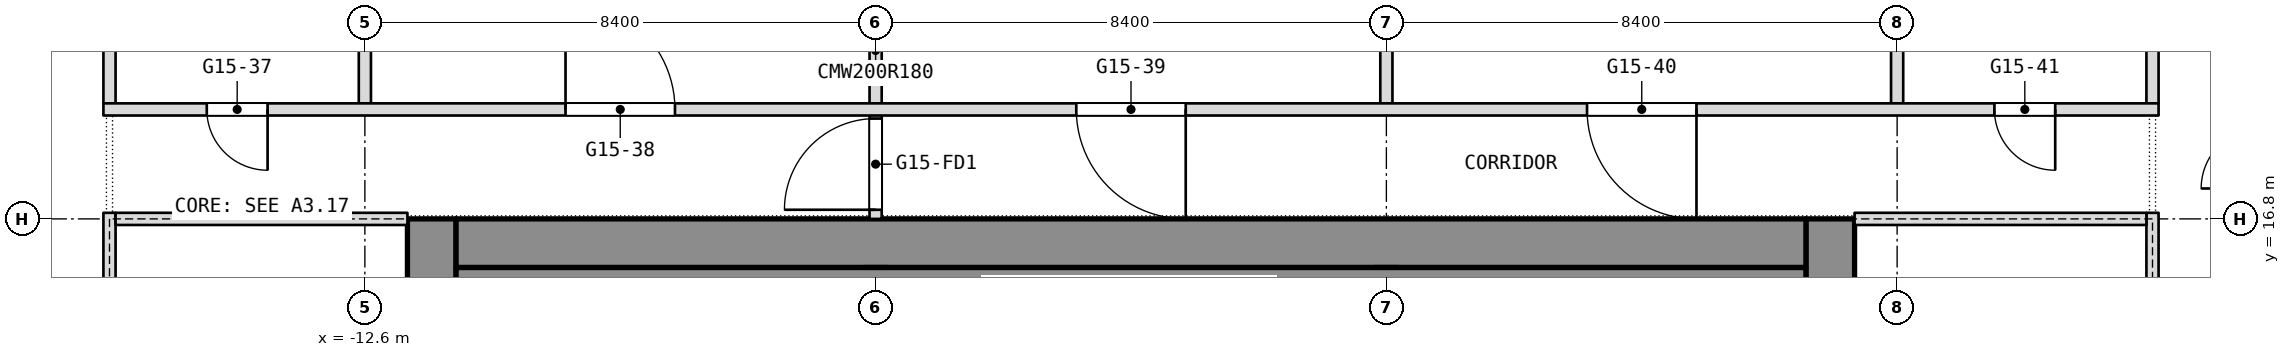
"""IFC4 building model, lengths in metres.
Left out: names, types, materials, properties, quantities, classifications, styles, units other than length and angle.
Written with IfcOpenShell. Run it as: python <this file> out.ifc"""

import sys

from ifc_helpers import new_model, si_unit, direction, frame, frame_2d, origin, place, context, subcontext, project, spatial, rectangle, extrude, element, fill, save


model = new_model("IFC4")
c1 = context("Model", 3, precision=1e-05, world=origin(), true_north=direction((0.0, 1.0)))
c2 = subcontext(c1, "Body", "Model", "MODEL_VIEW")
j1 = project(units=[si_unit("LENGTHUNIT", "METRE"), si_unit("PLANEANGLEUNIT", "RADIAN")], contexts=[c1])
p1 = place(None, origin())
s1 = spatial("IfcSite", under=j1, at=p1, CompositionType="ELEMENT")
p2 = place(p1, origin())
s2 = spatial("IfcBuilding", under=s1, at=p2, CompositionType="ELEMENT")
p3 = place(p2, frame((0.0, 0.0, 194.9)))
s3 = spatial("IfcBuildingStorey", under=s2, at=p3, CompositionType="ELEMENT", Elevation=194.9)
p4 = place(p3, frame((11.5, 0.0, 0.0), z_axis=(0.0, 0.0, 1.0), x_axis=(0.0, 1.0, 0.0)))
e1 = element("IfcWall", 1, at=p4, inside=s3, PredefinedType="SHEAR", context=c2, shape_type="SweptSolid", body=[
    extrude(rectangle(XDim=16.8, YDim=0.8, at=frame_2d((8.4, 0.0))), origin(), (0.0, 0.0, 1.0), 3.6),
])
p5 = place(p4, frame((2.3, 0.0, 0.0)))
e2 = element("IfcOpeningElement", 2, at=p5, cuts=e1, PredefinedType="OPENING", context=c2, shape_type="SweptSolid", body=[
    extrude(rectangle(XDim=1.1, YDim=2.1, at=frame_2d((0.55, 1.05))), frame((0.0, 0.4, 0.0), z_axis=(0.0, -1.0, 0.0), x_axis=(1.0, 0.0, 0.0)), (0.0, 0.0, 1.0), 0.8),
])
p6 = place(p4, frame((4.85, 0.0, 0.0)))
e3 = element("IfcOpeningElement", 3, at=p6, cuts=e1, PredefinedType="OPENING", context=c2, shape_type="SweptSolid", body=[
    extrude(rectangle(XDim=1.1, YDim=2.1, at=frame_2d((0.55, 1.05))), frame((0.0, 0.4, 0.0), z_axis=(0.0, -1.0, 0.0), x_axis=(1.0, 0.0, 0.0)), (0.0, 0.0, 1.0), 0.8),
])
p7 = place(p4, frame((6.825, 0.0, 0.0)))
e4 = element("IfcOpeningElement", 4, at=p7, cuts=e1, PredefinedType="OPENING", context=c2, shape_type="SweptSolid", body=[
    extrude(rectangle(XDim=1.2, YDim=2.1, at=frame_2d((0.6, 1.05))), frame((0.0, 0.4, 0.0), z_axis=(0.0, -1.0, 0.0), x_axis=(1.0, 0.0, 0.0)), (0.0, 0.0, 1.0), 0.8),
])
p8 = place(p4, frame((13.4, 0.0, 0.0)))
e5 = element("IfcOpeningElement", 5, at=p8, cuts=e1, PredefinedType="OPENING", context=c2, shape_type="SweptSolid", body=[
    extrude(rectangle(XDim=1.1, YDim=2.1, at=frame_2d((0.55, 1.05))), frame((0.0, 0.4, 0.0), z_axis=(0.0, -1.0, 0.0), x_axis=(1.0, 0.0, 0.0)), (0.0, 0.0, 1.0), 0.8),
])
p9 = place(p4, frame((10.85, 0.0, 0.0)))
e6 = element("IfcOpeningElement", 6, at=p9, cuts=e1, PredefinedType="OPENING", context=c2, shape_type="SweptSolid", body=[
    extrude(rectangle(XDim=1.1, YDim=2.1, at=frame_2d((0.55, 1.05))), frame((0.0, 0.4, 0.0), z_axis=(0.0, -1.0, 0.0), x_axis=(1.0, 0.0, 0.0)), (0.0, 0.0, 1.0), 0.8),
])
p10 = place(p4, frame((8.775, 0.0, 0.0)))
e7 = element("IfcOpeningElement", 7, at=p10, cuts=e1, PredefinedType="OPENING", context=c2, shape_type="SweptSolid", body=[
    extrude(rectangle(XDim=1.2, YDim=2.1, at=frame_2d((0.6, 1.05))), frame((0.0, 0.4, 0.0), z_axis=(0.0, -1.0, 0.0), x_axis=(1.0, 0.0, 0.0)), (0.0, 0.0, 1.0), 0.8),
])
p11 = place(p3, frame((-11.5, 0.0, 0.0), z_axis=(0.0, 0.0, 1.0), x_axis=(0.0, 1.0, 0.0)))
e8 = element("IfcWall", 8, at=p11, inside=s3, PredefinedType="SHEAR", context=c2, shape_type="SweptSolid", body=[
    extrude(rectangle(XDim=16.8, YDim=0.8, at=frame_2d((8.4, 0.0))), origin(), (0.0, 0.0, 1.0), 3.6),
])
p12 = place(p11, frame((1.837, 0.0, 0.0)))
e9 = element("IfcOpeningElement", 9, at=p12, cuts=e8, PredefinedType="OPENING", context=c2, shape_type="SweptSolid", body=[
    extrude(rectangle(XDim=0.9, YDim=2.1, at=frame_2d((0.45, 1.05))), frame((0.0, 0.4, 0.0), z_axis=(0.0, -1.0, 0.0), x_axis=(1.0, 0.0, 0.0)), (0.0, 0.0, 1.0), 0.8),
])
p13 = place(p11, frame((4.462, 0.0, 0.0)))
e10 = element("IfcOpeningElement", 10, at=p13, cuts=e8, PredefinedType="OPENING", context=c2, shape_type="SweptSolid", body=[
    extrude(rectangle(XDim=0.9, YDim=2.1, at=frame_2d((0.45, 1.05))), frame((0.0, 0.4, 0.0), z_axis=(0.0, -1.0, 0.0), x_axis=(1.0, 0.0, 0.0)), (0.0, 0.0, 1.0), 0.8),
])
p14 = place(p11, frame((6.825, 0.0, 0.0)))
e11 = element("IfcOpeningElement", 11, at=p14, cuts=e8, PredefinedType="OPENING", context=c2, shape_type="SweptSolid", body=[
    extrude(rectangle(XDim=1.2, YDim=2.1, at=frame_2d((0.6, 1.05))), frame((0.0, 0.4, 0.0), z_axis=(0.0, -1.0, 0.0), x_axis=(1.0, 0.0, 0.0)), (0.0, 0.0, 1.0), 0.8),
])
p15 = place(p11, frame((12.3, 0.0, 0.0)))
e12 = element("IfcOpeningElement", 12, at=p15, cuts=e8, PredefinedType="OPENING", context=c2, shape_type="SweptSolid", body=[
    extrude(rectangle(XDim=0.9, YDim=2.1, at=frame_2d((0.45, 1.05))), frame((0.0, 0.4, 0.0), z_axis=(0.0, -1.0, 0.0), x_axis=(1.0, 0.0, 0.0)), (0.0, 0.0, 1.0), 0.8),
])
p16 = place(p11, frame((8.775, 0.0, 0.0)))
e13 = element("IfcOpeningElement", 13, at=p16, cuts=e8, PredefinedType="OPENING", context=c2, shape_type="SweptSolid", body=[
    extrude(rectangle(XDim=1.2, YDim=2.1, at=frame_2d((0.6, 1.05))), frame((0.0, 0.4, 0.0), z_axis=(0.0, -1.0, 0.0), x_axis=(1.0, 0.0, 0.0)), (0.0, 0.0, 1.0), 0.8),
])
p17 = place(p3, frame((-11.1, 16.4, 0.0), z_axis=(0.0, 0.0, 1.0), x_axis=(1.0, 0.0, 0.0)))
e14 = element("IfcWall", 14, at=p17, inside=s3, PredefinedType="SHEAR", context=c2, shape_type="SweptSolid", body=[
    extrude(rectangle(XDim=22.2, YDim=0.8, at=frame_2d((11.1, 0.0))), origin(), (0.0, 0.0, 1.0), 3.6),
])
p18 = place(p3, frame((-4.2, 0.8, 0.0), z_axis=(0.0, 0.0, 1.0), x_axis=(0.0, 1.0, 0.0)))
e15 = element("IfcWall", 15, at=p18, inside=s3, PredefinedType="SHEAR", context=c2, shape_type="SweptSolid", body=[
    extrude(rectangle(XDim=15.2, YDim=0.4, at=frame_2d((7.6, 0.0))), origin(), (0.0, 0.0, 1.0), 3.6),
])
p19 = place(p18, frame((8.5, 0.0, 0.0)))
e16 = element("IfcOpeningElement", 16, at=p19, cuts=e15, PredefinedType="OPENING", context=c2, shape_type="SweptSolid", body=[
    extrude(rectangle(XDim=1.2, YDim=2.1, at=frame_2d((0.6, 1.05))), frame((0.0, 0.2, 0.0), z_axis=(0.0, -1.0, 0.0), x_axis=(1.0, 0.0, 0.0)), (0.0, 0.0, 1.0), 0.4),
])
p20 = place(p3, frame((4.2, 0.8, 0.0), z_axis=(0.0, 0.0, 1.0), x_axis=(0.0, 1.0, 0.0)))
e17 = element("IfcWall", 17, at=p20, inside=s3, PredefinedType="SHEAR", context=c2, shape_type="SweptSolid", body=[
    extrude(rectangle(XDim=15.2, YDim=0.4, at=frame_2d((7.6, 0.0))), origin(), (0.0, 0.0, 1.0), 3.6),
])
p21 = place(p20, frame((5.95, 0.0, 0.0)))
e18 = element("IfcOpeningElement", 18, at=p21, cuts=e17, PredefinedType="OPENING", context=c2, shape_type="SweptSolid", body=[
    extrude(rectangle(XDim=1.2, YDim=2.1, at=frame_2d((0.6, 1.05))), frame((0.0, 0.2, 0.0), z_axis=(0.0, -1.0, 0.0), x_axis=(1.0, 0.0, 0.0)), (0.0, 0.0, 1.0), 0.4),
])
for number, where, z_axis, x_axis in (
    (19, (16.8, 18.7, 0.0), (0.0, 0.0, 1.0), (0.0, 1.0, 0.0)),
    (20, (12.6, 18.7, 0.0), (0.0, 0.0, 1.0), (0.0, 1.0, 0.0)),
    (21, (4.2, 18.7, 0.0), (0.0, 0.0, 1.0), (0.0, 1.0, 0.0)),
):
    element("IfcWall", number, at=place(p3, frame(where, z_axis=z_axis, x_axis=x_axis)), inside=s3, PredefinedType="PARTITIONING", context=c2, shape_type="SweptSolid", body=[
        extrude(rectangle(XDim=3.64, YDim=0.2, at=frame_2d((1.82, 0.0))), origin(), (0.0, 0.0, 1.0), 3.34),
    ])
p22 = place(p3, frame((-4.2, 16.8, 0.0), z_axis=(0.0, 0.0, 1.0), x_axis=(0.0, 1.0, 0.0)))
e22 = element("IfcWall", 22, at=p22, inside=s3, PredefinedType="PARTITIONING", context=c2, shape_type="SweptSolid", body=[
    extrude(rectangle(XDim=5.54, YDim=0.2, at=frame_2d((2.77, 0.0))), origin(), (0.0, 0.0, 1.0), 3.34),
])
p23 = place(p22, frame((0.15, 0.0, 0.0)))
e23 = element("IfcOpeningElement", 23, at=p23, cuts=e22, PredefinedType="OPENING", context=c2, shape_type="SweptSolid", body=[
    extrude(rectangle(XDim=1.5, YDim=2.1, at=frame_2d((0.75, 1.05))), frame((0.0, 0.1, 0.0), z_axis=(0.0, -1.0, 0.0), x_axis=(1.0, 0.0, 0.0)), (0.0, 0.0, 1.0), 0.2),
])
for number, where, z_axis, x_axis in (
    (24, (-12.6, 18.7, 0.0), (0.0, 0.0, 1.0), (0.0, 1.0, 0.0)),
    (25, (-16.8, 18.7, 0.0), (0.0, 0.0, 1.0), (0.0, 1.0, 0.0)),
):
    element("IfcWall", number, at=place(p3, frame(where, z_axis=z_axis, x_axis=x_axis)), inside=s3, PredefinedType="PARTITIONING", context=c2, shape_type="SweptSolid", body=[
        extrude(rectangle(XDim=3.64, YDim=0.2, at=frame_2d((1.82, 0.0))), origin(), (0.0, 0.0, 1.0), 3.34),
    ])
p24 = place(p3, frame((-16.9, 18.6, 0.0), z_axis=(0.0, 0.0, 1.0), x_axis=(1.0, 0.0, 0.0)))
e26 = element("IfcWall", 26, at=p24, inside=s3, PredefinedType="PARTITIONING", context=c2, shape_type="SweptSolid", body=[
    extrude(rectangle(XDim=33.8, YDim=0.2, at=frame_2d((16.9, 0.0))), origin(), (0.0, 0.0, 1.0), 3.34),
])
p25 = place(p24, frame((1.7, 0.0, 0.0)))
e27 = element("IfcOpeningElement", 27, at=p25, cuts=e26, PredefinedType="OPENING", context=c2, shape_type="SweptSolid", body=[
    extrude(rectangle(XDim=1.0, YDim=2.1, at=frame_2d((0.5, 1.05))), frame((0.0, 0.1, 0.0), z_axis=(0.0, -1.0, 0.0), x_axis=(1.0, 0.0, 0.0)), (0.0, 0.0, 1.0), 0.2),
])
p26 = place(p24, frame((7.6, 0.0, 0.0)))
e28 = element("IfcOpeningElement", 28, at=p26, cuts=e26, PredefinedType="OPENING", context=c2, shape_type="SweptSolid", body=[
    extrude(rectangle(XDim=1.8, YDim=2.1, at=frame_2d((0.9, 1.05))), frame((0.0, 0.1, 0.0), z_axis=(0.0, -1.0, 0.0), x_axis=(1.0, 0.0, 0.0)), (0.0, 0.0, 1.0), 0.2),
])
p27 = place(p24, frame((16.0, 0.0, 0.0)))
e29 = element("IfcOpeningElement", 29, at=p27, cuts=e26, PredefinedType="OPENING", context=c2, shape_type="SweptSolid", body=[
    extrude(rectangle(XDim=1.8, YDim=2.1, at=frame_2d((0.9, 1.05))), frame((0.0, 0.1, 0.0), z_axis=(0.0, -1.0, 0.0), x_axis=(1.0, 0.0, 0.0)), (0.0, 0.0, 1.0), 0.2),
])
p28 = place(p24, frame((24.4, 0.0, 0.0)))
e30 = element("IfcOpeningElement", 30, at=p28, cuts=e26, PredefinedType="OPENING", context=c2, shape_type="SweptSolid", body=[
    extrude(rectangle(XDim=1.8, YDim=2.1, at=frame_2d((0.9, 1.05))), frame((0.0, 0.1, 0.0), z_axis=(0.0, -1.0, 0.0), x_axis=(1.0, 0.0, 0.0)), (0.0, 0.0, 1.0), 0.2),
])
p29 = place(p24, frame((31.1, 0.0, 0.0)))
e31 = element("IfcOpeningElement", 31, at=p29, cuts=e26, PredefinedType="OPENING", context=c2, shape_type="SweptSolid", body=[
    extrude(rectangle(XDim=1.0, YDim=2.1, at=frame_2d((0.5, 1.05))), frame((0.0, 0.1, 0.0), z_axis=(0.0, -1.0, 0.0), x_axis=(1.0, 0.0, 0.0)), (0.0, 0.0, 1.0), 0.2),
])
p30 = place(p3, frame((-11.1, 15.65, 0.0), z_axis=(0.0, 0.0, 1.0), x_axis=(1.0, 0.0, 0.0)))
e32 = element("IfcWall", 32, at=p30, inside=s3, PredefinedType="PARTITIONING", context=c2, shape_type="SweptSolid", body=[
    extrude(rectangle(XDim=22.2, YDim=0.7, at=frame_2d((11.1, 0.0))), origin(), (0.0, 0.0, 1.0), 3.34),
])
p31 = place(p3, frame((-16.8, -0.1, 0.0), z_axis=(0.0, 0.0, 1.0), x_axis=(0.0, 1.0, 0.0)))
e33 = element("IfcWall", 33, at=p31, inside=s3, PredefinedType="PARTITIONING", context=c2, shape_type="SweptSolid", body=[
    extrude(rectangle(XDim=17.0, YDim=0.2, at=frame_2d((8.5, 0.0))), origin(), (0.0, 0.0, 1.0), 3.34),
])
p32 = place(p31, frame((2.2, 0.0, 0.0)))
e34 = element("IfcOpeningElement", 34, at=p32, cuts=e33, PredefinedType="OPENING", context=c2, shape_type="SweptSolid", body=[
    extrude(rectangle(XDim=1.8, YDim=2.1, at=frame_2d((0.9, 1.05))), frame((0.0, 0.1, 0.0), z_axis=(0.0, -1.0, 0.0), x_axis=(1.0, 0.0, 0.0)), (0.0, 0.0, 1.0), 0.2),
])
p33 = place(p31, frame((13.0, 0.0, 0.0)))
e35 = element("IfcOpeningElement", 35, at=p33, cuts=e33, PredefinedType="OPENING", context=c2, shape_type="SweptSolid", body=[
    extrude(rectangle(XDim=1.8, YDim=2.1, at=frame_2d((0.9, 1.05))), frame((0.0, 0.1, 0.0), z_axis=(0.0, -1.0, 0.0), x_axis=(1.0, 0.0, 0.0)), (0.0, 0.0, 1.0), 0.2),
])
p34 = place(p3, frame((-16.7, 16.8, 0.0), z_axis=(0.0, 0.0, 1.0), x_axis=(1.0, 0.0, 0.0)))
e36 = element("IfcWall", 36, at=p34, inside=s3, PredefinedType="PARTITIONING", context=c2, shape_type="SweptSolid", body=[
    extrude(rectangle(XDim=4.8, YDim=0.2, at=frame_2d((2.4, 0.0))), origin(), (0.0, 0.0, 1.0), 2.94),
])
p35 = place(p3, frame((16.8, -0.1, 0.0), z_axis=(0.0, 0.0, 1.0), x_axis=(0.0, 1.0, 0.0)))
e37 = element("IfcWall", 37, at=p35, inside=s3, PredefinedType="PARTITIONING", context=c2, shape_type="SweptSolid", body=[
    extrude(rectangle(XDim=17.0, YDim=0.2, at=frame_2d((8.5, 0.0))), origin(), (0.0, 0.0, 1.0), 3.34),
])
p36 = place(p35, frame((2.2, 0.0, 0.0)))
e38 = element("IfcOpeningElement", 38, at=p36, cuts=e37, PredefinedType="OPENING", context=c2, shape_type="SweptSolid", body=[
    extrude(rectangle(XDim=1.8, YDim=2.1, at=frame_2d((0.9, 1.05))), frame((0.0, 0.1, 0.0), z_axis=(0.0, -1.0, 0.0), x_axis=(1.0, 0.0, 0.0)), (0.0, 0.0, 1.0), 0.2),
])
p37 = place(p35, frame((13.0, 0.0, 0.0)))
e39 = element("IfcOpeningElement", 39, at=p37, cuts=e37, PredefinedType="OPENING", context=c2, shape_type="SweptSolid", body=[
    extrude(rectangle(XDim=1.8, YDim=2.1, at=frame_2d((0.9, 1.05))), frame((0.0, 0.1, 0.0), z_axis=(0.0, -1.0, 0.0), x_axis=(1.0, 0.0, 0.0)), (0.0, 0.0, 1.0), 0.2),
])
p38 = place(p3, frame((11.9, 16.8, 0.0), z_axis=(0.0, 0.0, 1.0), x_axis=(1.0, 0.0, 0.0)))
e40 = element("IfcWall", 40, at=p38, inside=s3, PredefinedType="PARTITIONING", context=c2, shape_type="SweptSolid", body=[
    extrude(rectangle(XDim=4.8, YDim=0.2, at=frame_2d((2.4, 0.0))), origin(), (0.0, 0.0, 1.0), 2.94),
])
p39 = place(p25, origin())
e41 = element("IfcDoor", 41, at=p39, inside=s3, OperationType="SINGLE_SWING_LEFT", PredefinedType="DOOR", context=c2, shape_type="SweptSolid", body=[
    extrude(rectangle(XDim=1.0, YDim=2.1, at=frame_2d((0.5, 1.05))), frame((0.0, 0.025, 0.0), z_axis=(0.0, -1.0, 0.0), x_axis=(1.0, 0.0, 0.0)), (0.0, 0.0, 1.0), 0.05),
])
fill(e27, e41)
p40 = place(p26, origin())
e42 = element("IfcDoor", 42, at=p40, inside=s3, OperationType="DOUBLE_DOOR_SINGLE_SWING", PredefinedType="DOOR", context=c2, shape_type="SweptSolid", body=[
    extrude(rectangle(XDim=1.8, YDim=2.1, at=frame_2d((0.9, 1.05))), frame((0.0, 0.025, 0.0), z_axis=(0.0, -1.0, 0.0), x_axis=(1.0, 0.0, 0.0)), (0.0, 0.0, 1.0), 0.05),
])
fill(e28, e42)
p41 = place(p27, origin())
e43 = element("IfcDoor", 43, at=p41, inside=s3, OperationType="DOUBLE_DOOR_SINGLE_SWING", PredefinedType="DOOR", context=c2, shape_type="SweptSolid", body=[
    extrude(rectangle(XDim=1.8, YDim=2.1, at=frame_2d((0.9, 1.05))), frame((0.0, 0.025, 0.0), z_axis=(0.0, -1.0, 0.0), x_axis=(1.0, 0.0, 0.0)), (0.0, 0.0, 1.0), 0.05),
])
fill(e29, e43)
p42 = place(p28, origin())
e44 = element("IfcDoor", 44, at=p42, inside=s3, OperationType="DOUBLE_DOOR_SINGLE_SWING", PredefinedType="DOOR", context=c2, shape_type="SweptSolid", body=[
    extrude(rectangle(XDim=1.8, YDim=2.1, at=frame_2d((0.9, 1.05))), frame((0.0, 0.025, 0.0), z_axis=(0.0, -1.0, 0.0), x_axis=(1.0, 0.0, 0.0)), (0.0, 0.0, 1.0), 0.05),
])
fill(e30, e44)
p43 = place(p29, origin())
e45 = element("IfcDoor", 45, at=p43, inside=s3, OperationType="SINGLE_SWING_LEFT", PredefinedType="DOOR", context=c2, shape_type="SweptSolid", body=[
    extrude(rectangle(XDim=1.0, YDim=2.1, at=frame_2d((0.5, 1.05))), frame((0.0, 0.025, 0.0), z_axis=(0.0, -1.0, 0.0), x_axis=(1.0, 0.0, 0.0)), (0.0, 0.0, 1.0), 0.05),
])
fill(e31, e45)
p44 = place(p23, origin())
e46 = element("IfcDoor", 46, at=p44, inside=s3, OperationType="DOUBLE_DOOR_DOUBLE_SWING", PredefinedType="DOOR", context=c2, shape_type="SweptSolid", body=[
    extrude(rectangle(XDim=1.5, YDim=2.1, at=frame_2d((0.75, 1.05))), frame((0.0, 0.025, 0.0), z_axis=(0.0, -1.0, 0.0), x_axis=(1.0, 0.0, 0.0)), (0.0, 0.0, 1.0), 0.05),
])
fill(e23, e46)
save(model, sys.argv[1])
